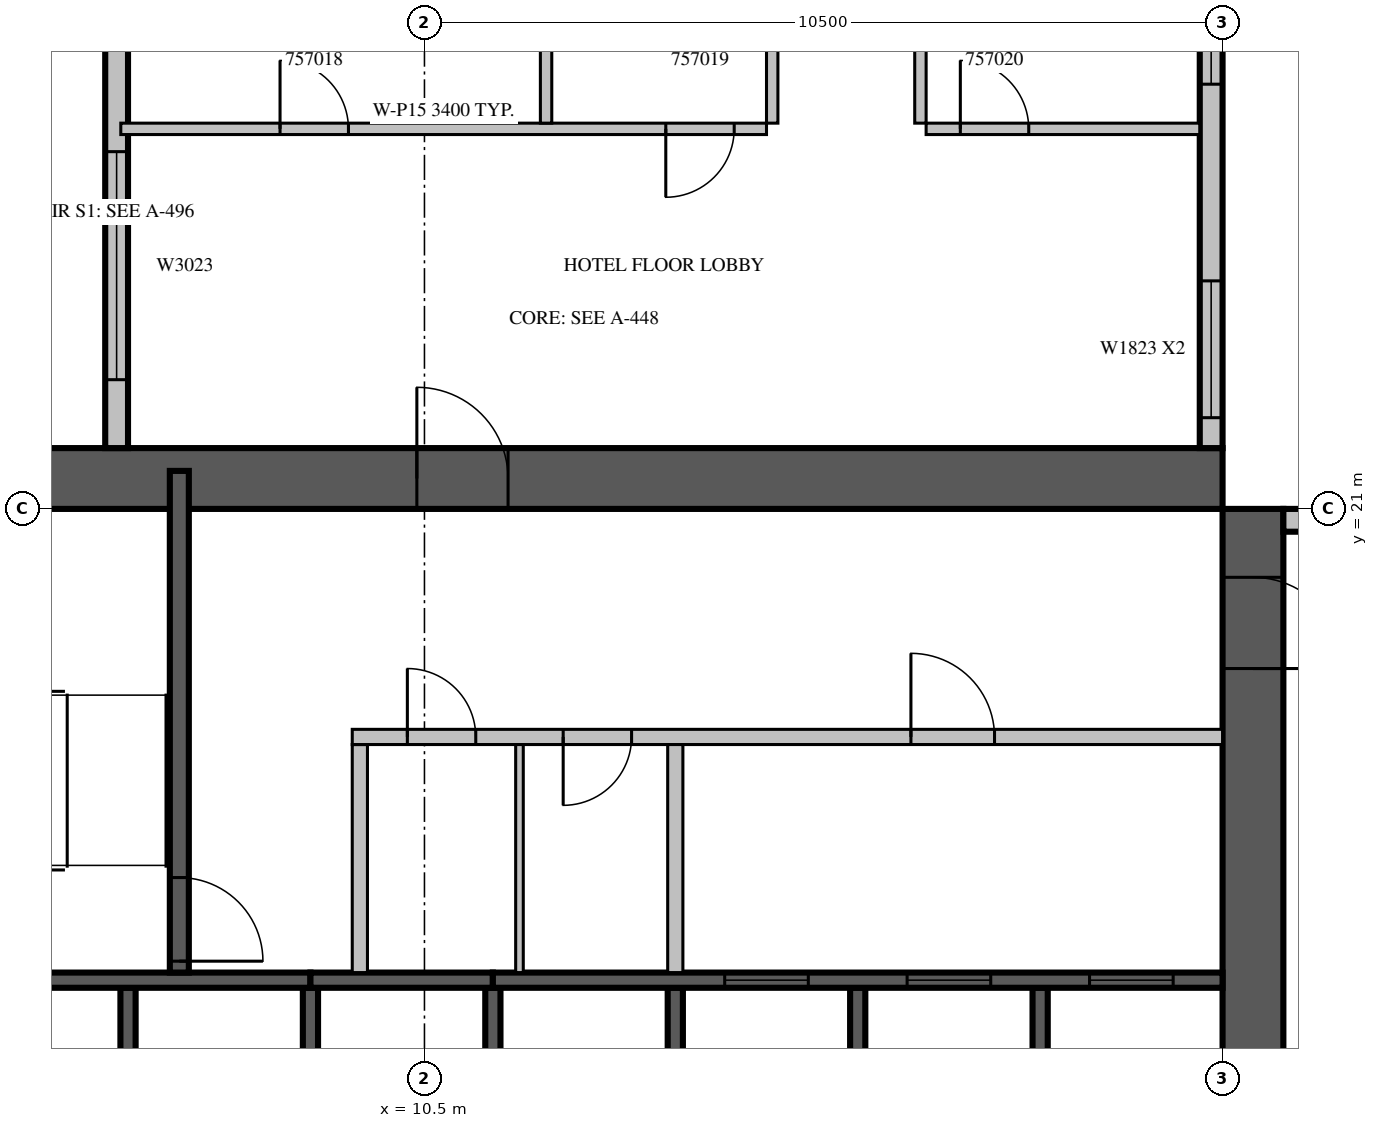
"""IFC4 building model, lengths in metres.
Left out: names, types, materials, properties, quantities, classifications, styles, units other than length and angle.
Written with IfcOpenShell. Run it as: python <this file> out.ifc"""

import sys

from ifc_helpers import new_model, si_unit, direction, frame, frame_2d, origin, place, context, subcontext, project, spatial, rectangle, extrude, source, transform, mapped, element, fill, save


model = new_model("IFC4")
c1 = context("Model", 3, precision=1e-05, world=origin(), true_north=direction((0.0, 1.0)))
c2 = subcontext(c1, "Body", "Model", "MODEL_VIEW")
j1 = project(units=[si_unit("LENGTHUNIT", "METRE"), si_unit("PLANEANGLEUNIT", "RADIAN")], contexts=[c1])
p1 = place(None, origin())
s1 = spatial("IfcSite", under=j1, at=p1, CompositionType="ELEMENT")
p2 = place(p1, origin())
s2 = spatial("IfcBuilding", under=s1, at=p2, CompositionType="ELEMENT")
p3 = place(p2, frame((0.0, 0.0, 250.0)))
s3 = spatial("IfcBuildingStorey", under=s2, at=p3, CompositionType="ELEMENT", Elevation=250.0)
m1 = source(origin(), c2, "Body", "SweptSolid", [
    extrude(rectangle(XDim=16.8, YDim=0.8, at=frame_2d((8.4, 0.0))), origin(), (0.0, 0.0, 1.0), 3.8),
])
p4 = place(p3, frame((21.4, 4.2, 0.0), z_axis=(0.0, 0.0, 1.0), x_axis=(0.0, 1.0, 0.0)))
e1 = element("IfcWall", 1, at=p4, inside=s3, PredefinedType="SHEAR", context=c2, shape_type="MappedRepresentation", body=[
    mapped(m1, transform((0.0, 0.0, 0.0), scale=1.0)),
])
m2 = source(origin(), c2, "Body", "SweptSolid", [
    extrude(rectangle(XDim=2.2, YDim=2.1, at=frame_2d((1.1, 1.05))), frame((0.0, 0.41, 0.0), z_axis=(0.0, -1.0, 0.0), x_axis=(1.0, 0.0, 0.0)), (0.0, 0.0, 1.0), 0.82),
])
p5 = place(p4, frame((4.2, 0.0, 0.0)))
e2 = element("IfcOpeningElement", 2, at=p5, cuts=e1, PredefinedType="OPENING", context=c2, shape_type="MappedRepresentation", body=[
    mapped(m2, transform((0.0, 0.0, 0.0), scale=1.0)),
])
m3 = source(origin(), c2, "Body", "SweptSolid", [
    extrude(rectangle(XDim=1.2, YDim=2.1, at=frame_2d((0.6, 1.05))), frame((0.0, 0.41, 0.0), z_axis=(0.0, -1.0, 0.0), x_axis=(1.0, 0.0, 0.0)), (0.0, 0.0, 1.0), 0.82),
])
p6 = place(p4, frame((14.7, 0.0, 0.0)))
e3 = element("IfcOpeningElement", 3, at=p6, cuts=e1, PredefinedType="OPENING", context=c2, shape_type="MappedRepresentation", body=[
    mapped(m3, transform((0.0, 0.0, 0.0), scale=1.0)),
])
p7 = place(p3, frame((4.2, 21.4, 0.0), z_axis=(0.0, 0.0, 1.0), x_axis=(1.0, 0.0, 0.0)))
e4 = element("IfcWall", 4, at=p7, inside=s3, PredefinedType="SHEAR", context=c2, shape_type="MappedRepresentation", body=[
    mapped(m1, transform((0.0, 0.0, 0.0), scale=1.0)),
])
p8 = place(p7, frame((6.2, 0.0, 0.0)))
e5 = element("IfcOpeningElement", 5, at=p8, cuts=e4, PredefinedType="OPENING", context=c2, shape_type="MappedRepresentation", body=[
    mapped(m3, transform((0.0, 0.0, 0.0), scale=1.0)),
])
m4 = source(origin(), c2, "Body", "SweptSolid", [
    extrude(rectangle(XDim=7.2, YDim=0.3, at=frame_2d((3.6, 0.0))), origin(), (0.0, 0.0, 1.0), 3.4),
])
p9 = place(p3, frame((29.0, 20.85, 0.0), z_axis=(0.0, 0.0, 1.0), x_axis=(-1.0, 0.0, 0.0)))
e6 = element("IfcWall", 6, at=p9, inside=s3, PredefinedType="STANDARD", context=c2, shape_type="MappedRepresentation", body=[
    mapped(m4, transform((0.0, 0.0, 0.0), scale=1.0)),
])
m5 = source(origin(), c2, "Body", "SweptSolid", [
    extrude(rectangle(XDim=1.8, YDim=2.3, at=frame_2d((0.9, 1.15))), frame((0.0, 0.16, 0.0), z_axis=(0.0, -1.0, 0.0), x_axis=(1.0, 0.0, 0.0)), (0.0, 0.0, 1.0), 0.32),
])
p10 = place(p9, frame((0.613, 0.0, 0.6)))
e7 = element("IfcOpeningElement", 7, at=p10, cuts=e6, PredefinedType="OPENING", context=c2, shape_type="MappedRepresentation", body=[
    mapped(m5, transform((0.0, 0.0, 0.0), scale=1.0)),
])
p11 = place(p9, frame((5.0, 0.0, 0.6)))
e8 = element("IfcOpeningElement", 8, at=p11, cuts=e6, PredefinedType="OPENING", context=c2, shape_type="MappedRepresentation", body=[
    mapped(m5, transform((0.0, 0.0, 0.0), scale=1.0)),
])
p12 = place(p3, frame((20.85, 21.8, 0.0), z_axis=(0.0, 0.0, 1.0), x_axis=(0.0, 1.0, 0.0)))
e9 = element("IfcWall", 9, at=p12, inside=s3, PredefinedType="STANDARD", context=c2, shape_type="MappedRepresentation", body=[
    mapped(m4, transform((0.0, 0.0, 0.0), scale=1.0)),
])
p13 = place(p12, frame((0.4, 0.0, 0.6)))
e10 = element("IfcOpeningElement", 10, at=p13, cuts=e9, PredefinedType="OPENING", context=c2, shape_type="MappedRepresentation", body=[
    mapped(m5, transform((0.0, 0.0, 0.0), scale=1.0)),
])
p14 = place(p12, frame((4.787, 0.0, 0.6)))
e11 = element("IfcOpeningElement", 11, at=p14, cuts=e9, PredefinedType="OPENING", context=c2, shape_type="MappedRepresentation", body=[
    mapped(m5, transform((0.0, 0.0, 0.0), scale=1.0)),
])
m6 = source(origin(), c2, "Body", "SweptSolid", [
    extrude(rectangle(XDim=16.6, YDim=0.3, at=frame_2d((8.3, 0.0))), origin(), (0.0, 0.0, 1.0), 2.9),
])
p15 = place(p3, frame((6.45, 38.4, 0.0), z_axis=(0.0, 0.0, 1.0), x_axis=(0.0, -1.0, 0.0)))
e12 = element("IfcWall", 12, at=p15, inside=s3, PredefinedType="STANDARD", context=c2, shape_type="MappedRepresentation", body=[
    mapped(m6, transform((0.0, 0.0, 0.0), scale=1.0)),
])
p16 = place(p15, frame((1.15, 0.0, 0.6)))
e13 = element("IfcOpeningElement", 13, at=p16, cuts=e12, PredefinedType="OPENING", context=c2, shape_type="MappedRepresentation", body=[
    mapped(m5, transform((0.0, 0.0, 0.0), scale=1.0)),
])
m7 = source(origin(), c2, "Body", "SweptSolid", [
    extrude(rectangle(XDim=2.4, YDim=2.3, at=frame_2d((1.2, 1.15))), frame((0.0, 0.16, 0.0), z_axis=(0.0, -1.0, 0.0), x_axis=(1.0, 0.0, 0.0)), (0.0, 0.0, 1.0), 0.32),
])
p17 = place(p15, frame((4.75, 0.0, 0.6)))
e14 = element("IfcOpeningElement", 14, at=p17, cuts=e12, PredefinedType="OPENING", context=c2, shape_type="MappedRepresentation", body=[
    mapped(m7, transform((0.0, 0.0, 0.0), scale=1.0)),
])
p18 = place(p15, frame((9.438, 0.0, 0.6)))
e15 = element("IfcOpeningElement", 15, at=p18, cuts=e12, PredefinedType="OPENING", context=c2, shape_type="MappedRepresentation", body=[
    mapped(m5, transform((0.0, 0.0, 0.0), scale=1.0)),
])
m8 = source(origin(), c2, "Body", "SweptSolid", [
    extrude(rectangle(XDim=3.0, YDim=2.3, at=frame_2d((1.5, 1.15))), frame((0.0, 0.16, 0.0), z_axis=(0.0, -1.0, 0.0), x_axis=(1.0, 0.0, 0.0)), (0.0, 0.0, 1.0), 0.32),
])
p19 = place(p15, frame((12.7, 0.0, 0.6)))
e16 = element("IfcOpeningElement", 16, at=p19, cuts=e12, PredefinedType="OPENING", context=c2, shape_type="MappedRepresentation", body=[
    mapped(m8, transform((0.0, 0.0, 0.0), scale=1.0)),
])
m9 = source(origin(), c2, "Body", "SweptSolid", [
    extrude(rectangle(XDim=3.0, YDim=0.2, at=frame_2d((1.5, 0.0))), origin(), (0.0, 0.0, 1.0), 3.8),
])
p20 = place(p3, frame((6.6, 11.7, 0.0), z_axis=(0.0, 0.0, 1.0), x_axis=(0.0, 1.0, 0.0)))
e17 = element("IfcWall", 17, at=p20, inside=s3, PredefinedType="SOLIDWALL", context=c2, shape_type="MappedRepresentation", body=[
    mapped(m9, transform((0.0, 0.0, 0.0), scale=1.0)),
])
m10 = source(origin(), c2, "Body", "SweptSolid", [
    extrude(rectangle(XDim=3.0, YDim=0.2, at=frame_2d((1.5, 0.0))), origin(), (0.0, 0.0, 1.0), 3.4),
])
for number, where, z_axis, x_axis in (
    (18, (9.0, 11.7, 0.0), (0.0, 0.0, 1.0), (0.0, 1.0, 0.0)),
    (19, (11.4, 11.7, 0.0), (0.0, 0.0, 1.0), (0.0, 1.0, 0.0)),
):
    element("IfcWall", number, at=place(p3, frame(where, z_axis=z_axis, x_axis=x_axis)), inside=s3, PredefinedType="SOLIDWALL", context=c2, shape_type="MappedRepresentation", body=[
        mapped(m10, transform((0.0, 0.0, 0.0), scale=1.0)),
    ])
for number, where, z_axis, x_axis in (
    (20, (13.8, 11.7, 0.0), (0.0, 0.0, 1.0), (0.0, 1.0, 0.0)),
    (21, (16.2, 11.7, 0.0), (0.0, 0.0, 1.0), (0.0, 1.0, 0.0)),
    (22, (18.6, 11.7, 0.0), (0.0, 0.0, 1.0), (0.0, 1.0, 0.0)),
):
    element("IfcWall", number, at=place(p3, frame(where, z_axis=z_axis, x_axis=x_axis)), inside=s3, PredefinedType="SOLIDWALL", context=c2, shape_type="MappedRepresentation", body=[
        mapped(m9, transform((0.0, 0.0, 0.0), scale=1.0)),
    ])
m11 = source(origin(), c2, "Body", "SweptSolid", [
    extrude(rectangle(XDim=4.8, YDim=0.2, at=frame_2d((2.4, 0.0))), origin(), (0.0, 0.0, 1.0), 3.8),
])
p21 = place(p3, frame((4.2, 14.8, 0.0), z_axis=(0.0, 0.0, 1.0), x_axis=(1.0, 0.0, 0.0)))
e23 = element("IfcWall", 23, at=p21, inside=s3, PredefinedType="SOLIDWALL", context=c2, shape_type="MappedRepresentation", body=[
    mapped(m11, transform((0.0, 0.0, 0.0), scale=1.0)),
])
m12 = source(origin(), c2, "Body", "SweptSolid", [
    extrude(rectangle(XDim=2.4, YDim=0.2, at=frame_2d((1.2, 0.0))), origin(), (0.0, 0.0, 1.0), 3.4),
])
p22 = place(p3, frame((9.0, 14.8, 0.0), z_axis=(0.0, 0.0, 1.0), x_axis=(1.0, 0.0, 0.0)))
e24 = element("IfcWall", 24, at=p22, inside=s3, PredefinedType="SOLIDWALL", context=c2, shape_type="MappedRepresentation", body=[
    mapped(m12, transform((0.0, 0.0, 0.0), scale=1.0)),
])
m13 = source(origin(), c2, "Body", "SweptSolid", [
    extrude(rectangle(XDim=9.6, YDim=0.2, at=frame_2d((4.8, 0.0))), origin(), (0.0, 0.0, 1.0), 3.8),
])
p23 = place(p3, frame((11.4, 14.8, 0.0), z_axis=(0.0, 0.0, 1.0), x_axis=(1.0, 0.0, 0.0)))
e25 = element("IfcWall", 25, at=p23, inside=s3, PredefinedType="SOLIDWALL", context=c2, shape_type="MappedRepresentation", body=[
    mapped(m13, transform((0.0, 0.0, 0.0), scale=1.0)),
])
m14 = source(origin(), c2, "Body", "SweptSolid", [
    extrude(rectangle(XDim=1.1, YDim=2.1, at=frame_2d((0.55, 1.05))), frame((0.0, 0.11, 0.0), z_axis=(0.0, -1.0, 0.0), x_axis=(1.0, 0.0, 0.0)), (0.0, 0.0, 1.0), 0.22),
])
p24 = place(p23, frame((3.05, 0.0, 0.0)))
e26 = element("IfcOpeningElement", 26, at=p24, cuts=e25, PredefinedType="OPENING", context=c2, shape_type="MappedRepresentation", body=[
    mapped(m14, transform((0.0, 0.0, 0.0), scale=1.0)),
])
p25 = place(p23, frame((5.45, 0.0, 0.0)))
e27 = element("IfcOpeningElement", 27, at=p25, cuts=e25, PredefinedType="OPENING", context=c2, shape_type="MappedRepresentation", body=[
    mapped(m14, transform((0.0, 0.0, 0.0), scale=1.0)),
])
p26 = place(p23, frame((7.85, 0.0, 0.0)))
e28 = element("IfcOpeningElement", 28, at=p26, cuts=e25, PredefinedType="OPENING", context=c2, shape_type="MappedRepresentation", body=[
    mapped(m14, transform((0.0, 0.0, 0.0), scale=1.0)),
])
m15 = source(origin(), c2, "Body", "SweptSolid", [
    extrude(rectangle(XDim=6.6, YDim=0.25, at=frame_2d((3.3, 0.0))), origin(), (0.0, 0.0, 1.0), 3.4),
])
p27 = place(p3, frame((7.275, 14.9, 0.0), z_axis=(0.0, 0.0, 1.0), x_axis=(0.0, 1.0, 0.0)))
e29 = element("IfcWall", 29, at=p27, inside=s3, PredefinedType="SOLIDWALL", context=c2, shape_type="MappedRepresentation", body=[
    mapped(m15, transform((0.0, 0.0, 0.0), scale=1.0)),
])
m16 = source(origin(), c2, "Body", "SweptSolid", [
    extrude(rectangle(XDim=1.1, YDim=2.1, at=frame_2d((0.55, 1.05))), frame((0.0, 0.135, 0.0), z_axis=(0.0, -1.0, 0.0), x_axis=(1.0, 0.0, 0.0)), (0.0, 0.0, 1.0), 0.27),
])
p28 = place(p27, frame((0.15, 0.0, 0.0)))
e30 = element("IfcOpeningElement", 30, at=p28, cuts=e29, PredefinedType="OPENING", context=c2, shape_type="MappedRepresentation", body=[
    mapped(m16, transform((0.0, 0.0, 0.0), scale=1.0)),
])
m17 = source(origin(), c2, "Body", "SweptSolid", [
    extrude(rectangle(XDim=3.0, YDim=0.2, at=frame_2d((1.5, 0.0))), origin(), (0.0, 0.0, 1.0), 3.4),
])
p29 = place(p3, frame((9.65, 14.9, 0.0), z_axis=(0.0, 0.0, 1.0), x_axis=(0.0, 1.0, 0.0)))
e31 = element("IfcWall", 31, at=p29, inside=s3, PredefinedType="PARTITIONING", context=c2, shape_type="MappedRepresentation", body=[
    mapped(m17, transform((0.0, 0.0, 0.0), scale=1.0)),
])
m18 = source(origin(), c2, "Body", "SweptSolid", [
    extrude(rectangle(XDim=11.45, YDim=0.2, at=frame_2d((5.725, 0.0))), origin(), (0.0, 0.0, 1.0), 3.4),
])
p30 = place(p3, frame((9.55, 18.0, 0.0), z_axis=(0.0, 0.0, 1.0), x_axis=(1.0, 0.0, 0.0)))
e32 = element("IfcWall", 32, at=p30, inside=s3, PredefinedType="PARTITIONING", context=c2, shape_type="MappedRepresentation", body=[
    mapped(m18, transform((0.0, 0.0, 0.0), scale=1.0)),
])
m19 = source(origin(), c2, "Body", "SweptSolid", [
    extrude(rectangle(XDim=0.9, YDim=2.1, at=frame_2d((0.45, 1.05))), frame((0.0, 0.11, 0.0), z_axis=(0.0, -1.0, 0.0), x_axis=(1.0, 0.0, 0.0)), (0.0, 0.0, 1.0), 0.22),
])
p31 = place(p30, frame((0.725, 0.0, 0.0)))
e33 = element("IfcOpeningElement", 33, at=p31, cuts=e32, PredefinedType="OPENING", context=c2, shape_type="MappedRepresentation", body=[
    mapped(m19, transform((0.0, 0.0, 0.0), scale=1.0)),
])
p32 = place(p30, frame((2.775, 0.0, 0.0)))
e34 = element("IfcOpeningElement", 34, at=p32, cuts=e32, PredefinedType="OPENING", context=c2, shape_type="MappedRepresentation", body=[
    mapped(m19, transform((0.0, 0.0, 0.0), scale=1.0)),
])
p33 = place(p30, frame((7.35, 0.0, 0.0)))
e35 = element("IfcOpeningElement", 35, at=p33, cuts=e32, PredefinedType="OPENING", context=c2, shape_type="MappedRepresentation", body=[
    mapped(m14, transform((0.0, 0.0, 0.0), scale=1.0)),
])
p34 = place(p3, frame((13.8, 14.9, 0.0), z_axis=(0.0, 0.0, 1.0), x_axis=(0.0, 1.0, 0.0)))
e36 = element("IfcWall", 36, at=p34, inside=s3, PredefinedType="PARTITIONING", context=c2, shape_type="MappedRepresentation", body=[
    mapped(m17, transform((0.0, 0.0, 0.0), scale=1.0)),
])
m20 = source(origin(), c2, "Body", "SweptSolid", [
    extrude(rectangle(XDim=3.0, YDim=0.1, at=frame_2d((1.5, 0.0))), origin(), (0.0, 0.0, 1.0), 3.4),
])
p35 = place(p3, frame((11.75, 14.9, 0.0), z_axis=(0.0, 0.0, 1.0), x_axis=(0.0, 1.0, 0.0)))
e37 = element("IfcWall", 37, at=p35, inside=s3, PredefinedType="PARTITIONING", context=c2, shape_type="MappedRepresentation", body=[
    mapped(m20, transform((0.0, 0.0, 0.0), scale=1.0)),
])
m21 = source(origin(), c2, "Body", "SweptSolid", [
    extrude(rectangle(XDim=8.495, YDim=0.15, at=frame_2d((4.247, 0.0))), origin(), (0.0, 0.0, 1.0), 3.4),
])
p36 = place(p3, frame((6.505, 26.0, 0.0), z_axis=(0.0, 0.0, 1.0), x_axis=(1.0, 0.0, 0.0)))
e38 = element("IfcWall", 38, at=p36, inside=s3, PredefinedType="PARTITIONING", context=c2, shape_type="MappedRepresentation", body=[
    mapped(m21, transform((0.0, 0.0, 0.0), scale=1.0)),
])
m22 = source(origin(), c2, "Body", "SweptSolid", [
    extrude(rectangle(XDim=0.9, YDim=2.1, at=frame_2d((0.45, 1.05))), frame((0.0, 0.085, 0.0), z_axis=(0.0, -1.0, 0.0), x_axis=(1.0, 0.0, 0.0)), (0.0, 0.0, 1.0), 0.17),
])
p37 = place(p36, frame((2.095, 0.0, 0.0)))
e39 = element("IfcOpeningElement", 39, at=p37, cuts=e38, PredefinedType="OPENING", context=c2, shape_type="MappedRepresentation", body=[
    mapped(m22, transform((0.0, 0.0, 0.0), scale=1.0)),
])
p38 = place(p36, frame((7.17, 0.0, 0.0)))
e40 = element("IfcOpeningElement", 40, at=p38, cuts=e38, PredefinedType="OPENING", context=c2, shape_type="MappedRepresentation", body=[
    mapped(m22, transform((0.0, 0.0, 0.0), scale=1.0)),
])
m23 = source(origin(), c2, "Body", "SweptSolid", [
    extrude(rectangle(XDim=3.6, YDim=0.15, at=frame_2d((1.8, 0.0))), origin(), (0.0, 0.0, 1.0), 3.4),
])
p39 = place(p3, frame((17.1, 26.0, 0.0), z_axis=(0.0, 0.0, 1.0), x_axis=(1.0, 0.0, 0.0)))
e41 = element("IfcWall", 41, at=p39, inside=s3, PredefinedType="PARTITIONING", context=c2, shape_type="MappedRepresentation", body=[
    mapped(m23, transform((0.0, 0.0, 0.0), scale=1.0)),
])
p40 = place(p39, frame((0.45, 0.0, 0.0)))
e42 = element("IfcOpeningElement", 42, at=p40, cuts=e41, PredefinedType="OPENING", context=c2, shape_type="MappedRepresentation", body=[
    mapped(m22, transform((0.0, 0.0, 0.0), scale=1.0)),
])
m24 = source(origin(), c2, "Body", "SweptSolid", [
    extrude(rectangle(XDim=3.25, YDim=0.15, at=frame_2d((1.625, 0.0))), origin(), (0.0, 0.0, 1.0), 3.4),
])
for number, where, z_axis, x_axis in (
    (43, (12.1, 26.075, 0.0), (0.0, 0.0, 1.0), (0.0, 1.0, 0.0)),
    (44, (15.075, 26.075, 0.0), (0.0, 0.0, 1.0), (0.0, 1.0, 0.0)),
    (45, (17.025, 29.325, 0.0), (0.0, 0.0, 1.0), (0.0, -1.0, 0.0)),
):
    element("IfcWall", number, at=place(p3, frame(where, z_axis=z_axis, x_axis=x_axis)), inside=s3, PredefinedType="PARTITIONING", context=c2, shape_type="MappedRepresentation", body=[
        mapped(m24, transform((0.0, 0.0, 0.0), scale=1.0)),
    ])
m25 = source(origin(), c2, "Body", "SweptSolid", [
    extrude(rectangle(XDim=1.8, YDim=2.3, at=frame_2d((0.9, 1.15))), frame((0.0, 0.03, 0.0), z_axis=(0.0, -1.0, 0.0), x_axis=(1.0, 0.0, 0.0)), (0.0, 0.0, 1.0), 0.06),
])
p41 = place(p13, origin())
e46 = element("IfcWindow", 46, at=p41, inside=s3, PartitioningType="SINGLE_PANEL", PredefinedType="WINDOW", context=c2, shape_type="MappedRepresentation", body=[
    mapped(m25, transform((0.0, 0.0, 0.0), scale=1.0)),
])
fill(e10, e46)
p42 = place(p14, origin())
e47 = element("IfcWindow", 47, at=p42, inside=s3, PartitioningType="SINGLE_PANEL", PredefinedType="WINDOW", context=c2, shape_type="MappedRepresentation", body=[
    mapped(m25, transform((0.0, 0.0, 0.0), scale=1.0)),
])
fill(e11, e47)
m26 = source(origin(), c2, "Body", "SweptSolid", [
    extrude(rectangle(XDim=3.0, YDim=2.3, at=frame_2d((1.5, 1.15))), frame((0.0, 0.03, 0.0), z_axis=(0.0, -1.0, 0.0), x_axis=(1.0, 0.0, 0.0)), (0.0, 0.0, 1.0), 0.06),
])
p43 = place(p19, origin())
e48 = element("IfcWindow", 48, at=p43, inside=s3, PartitioningType="SINGLE_PANEL", PredefinedType="WINDOW", context=c2, shape_type="MappedRepresentation", body=[
    mapped(m26, transform((0.0, 0.0, 0.0), scale=1.0)),
])
fill(e16, e48)
m27 = source(origin(), c2, "Body", "SweptSolid", [
    extrude(rectangle(XDim=1.1, YDim=2.1, at=frame_2d((0.55, 1.05))), frame((0.0, 0.025, 0.0), z_axis=(0.0, -1.0, 0.0), x_axis=(1.0, 0.0, 0.0)), (0.0, 0.0, 1.0), 0.05),
])
p44 = place(p24, origin())
e49 = element("IfcDoor", 49, at=p44, inside=s3, OperationType="SLIDING_TO_LEFT", PredefinedType="DOOR", context=c2, shape_type="MappedRepresentation", body=[
    mapped(m27, transform((0.0, 0.0, 0.0), scale=1.0)),
])
fill(e26, e49)
p45 = place(p25, origin())
e50 = element("IfcDoor", 50, at=p45, inside=s3, OperationType="SLIDING_TO_LEFT", PredefinedType="DOOR", context=c2, shape_type="MappedRepresentation", body=[
    mapped(m27, transform((0.0, 0.0, 0.0), scale=1.0)),
])
fill(e27, e50)
p46 = place(p26, origin())
e51 = element("IfcDoor", 51, at=p46, inside=s3, OperationType="SLIDING_TO_LEFT", PredefinedType="DOOR", context=c2, shape_type="MappedRepresentation", body=[
    mapped(m27, transform((0.0, 0.0, 0.0), scale=1.0)),
])
fill(e28, e51)
p47 = place(p28, origin())
e52 = element("IfcDoor", 52, at=p47, inside=s3, OperationType="SINGLE_SWING_RIGHT", PredefinedType="DOOR", context=c2, shape_type="MappedRepresentation", body=[
    mapped(m27, transform((0.0, 0.0, 0.0), scale=1.0)),
])
fill(e30, e52)
m28 = source(origin(), c2, "Body", "SweptSolid", [
    extrude(rectangle(XDim=0.9, YDim=2.1, at=frame_2d((0.45, 1.05))), frame((0.0, 0.025, 0.0), z_axis=(0.0, -1.0, 0.0), x_axis=(1.0, 0.0, 0.0)), (0.0, 0.0, 1.0), 0.05),
])
p48 = place(p31, origin())
e53 = element("IfcDoor", 53, at=p48, inside=s3, OperationType="SINGLE_SWING_LEFT", PredefinedType="DOOR", context=c2, shape_type="MappedRepresentation", body=[
    mapped(m28, transform((0.0, 0.0, 0.0), scale=1.0)),
])
fill(e33, e53)
p49 = place(p32, origin())
e54 = element("IfcDoor", 54, at=p49, inside=s3, OperationType="SINGLE_SWING_RIGHT", PredefinedType="DOOR", context=c2, shape_type="MappedRepresentation", body=[
    mapped(m28, transform((0.0, 0.0, 0.0), scale=1.0)),
])
fill(e34, e54)
p50 = place(p33, origin())
e55 = element("IfcDoor", 55, at=p50, inside=s3, OperationType="SINGLE_SWING_LEFT", PredefinedType="DOOR", context=c2, shape_type="MappedRepresentation", body=[
    mapped(m27, transform((0.0, 0.0, 0.0), scale=1.0)),
])
fill(e35, e55)
m29 = source(origin(), c2, "Body", "SweptSolid", [
    extrude(rectangle(XDim=1.2, YDim=2.1, at=frame_2d((0.6, 1.05))), frame((0.0, 0.025, 0.0), z_axis=(0.0, -1.0, 0.0), x_axis=(1.0, 0.0, 0.0)), (0.0, 0.0, 1.0), 0.05),
])
p51 = place(p8, origin())
e56 = element("IfcDoor", 56, at=p51, inside=s3, OperationType="SINGLE_SWING_LEFT", PredefinedType="DOOR", context=c2, shape_type="MappedRepresentation", body=[
    mapped(m29, transform((0.0, 0.0, 0.0), scale=1.0)),
])
fill(e5, e56)
p52 = place(p6, origin())
e57 = element("IfcDoor", 57, at=p52, inside=s3, OperationType="SINGLE_SWING_RIGHT", PredefinedType="DOOR", context=c2, shape_type="MappedRepresentation", body=[
    mapped(m29, transform((0.0, 0.0, 0.0), scale=1.0)),
])
fill(e3, e57)
p53 = place(p37, origin())
e58 = element("IfcDoor", 58, at=p53, inside=s3, OperationType="SINGLE_SWING_LEFT", PredefinedType="DOOR", context=c2, shape_type="MappedRepresentation", body=[
    mapped(m28, transform((0.0, 0.0, 0.0), scale=1.0)),
])
fill(e39, e58)
p54 = place(p38, origin())
e59 = element("IfcDoor", 59, at=p54, inside=s3, OperationType="SINGLE_SWING_RIGHT", PredefinedType="DOOR", context=c2, shape_type="MappedRepresentation", body=[
    mapped(m28, transform((0.0, 0.0, 0.0), scale=1.0)),
])
fill(e40, e59)
p55 = place(p40, origin())
e60 = element("IfcDoor", 60, at=p55, inside=s3, OperationType="SINGLE_SWING_LEFT", PredefinedType="DOOR", context=c2, shape_type="MappedRepresentation", body=[
    mapped(m28, transform((0.0, 0.0, 0.0), scale=1.0)),
])
fill(e42, e60)
save(model, sys.argv[1])
